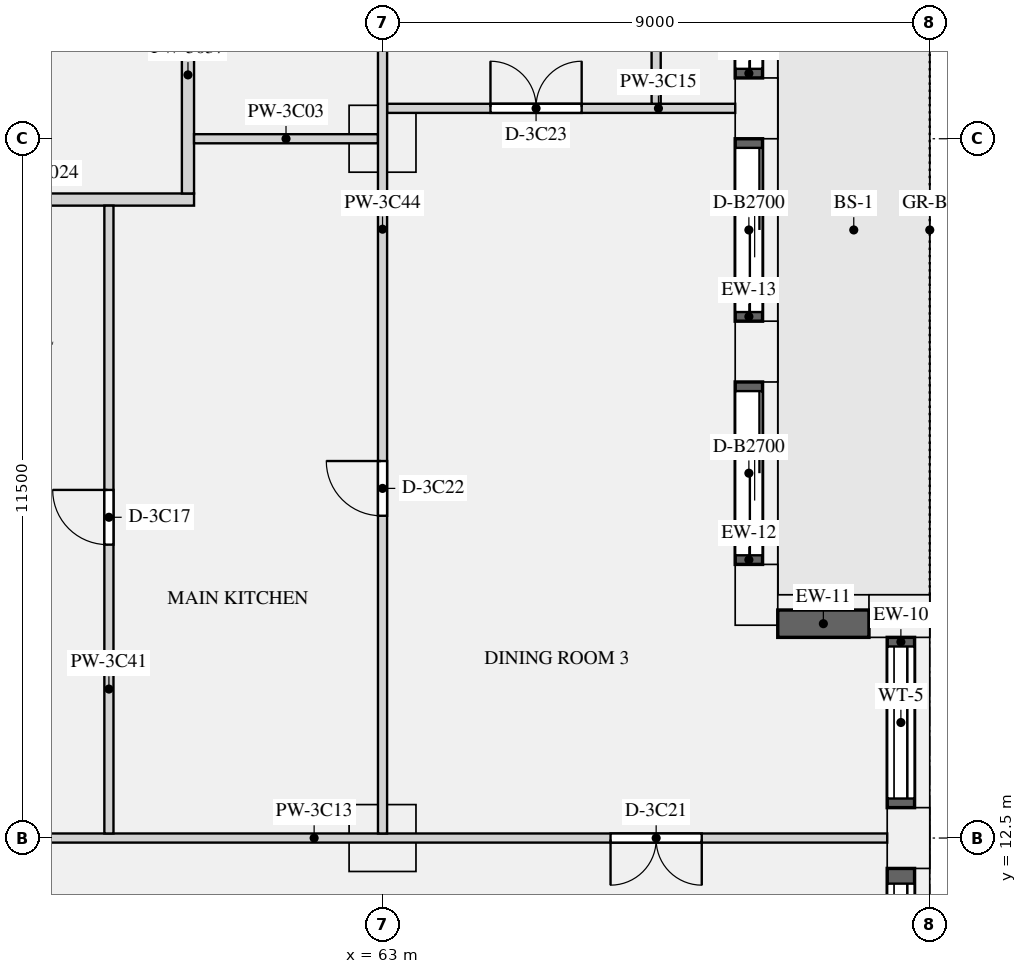
"""IFC4 building model, lengths in metres.
Left out: names, types, materials, properties, quantities, classifications, styles, units other than length and angle.
Written with IfcOpenShell. Run it as: python <this file> out.ifc"""

import sys

from ifc_helpers import new_model, si_unit, direction, frame, frame_2d, origin, origin_2d, place, context, subcontext, project, spatial, rectangle, extrude, element, fill, save


model = new_model("IFC4")
c1 = context("Model", 3, precision=1e-05, world=origin(), true_north=direction((0.0, 1.0)))
c2 = subcontext(c1, "Body", "Model", "MODEL_VIEW")
j1 = project(units=[si_unit("LENGTHUNIT", "METRE"), si_unit("PLANEANGLEUNIT", "RADIAN")], contexts=[c1])
p1 = place(None, origin())
s1 = spatial("IfcSite", under=j1, at=p1, CompositionType="ELEMENT")
p2 = place(p1, origin())
s2 = spatial("IfcBuilding", under=s1, at=p2, CompositionType="ELEMENT")
p3 = place(p2, frame((0.0, 0.0, 160.2)))
s3 = spatial("IfcBuildingStorey", under=s2, at=p3, CompositionType="ELEMENT", Elevation=160.2)
for number, where, z_axis, x_axis in (
    (1, (71.65, 12.5, 0.0), (0.0, 0.0, 1.0), (0.0, 1.0, 0.0)),
    (2, (71.5, 16.15, 0.0), (0.0, 0.0, 1.0), (-1.0, 0.0, 0.0)),
    (3, (69.15, 16.5, 0.0), (0.0, 0.0, 1.0), (0.0, 1.0, 0.0)),
    (4, (69.15, 20.5, 0.0), (0.0, 0.0, 1.0), (0.0, 1.0, 0.0)),
    (5, (69.15, 24.5, 0.0), (0.0, 0.0, 1.0), (0.0, 1.0, 0.0)),
):
    element("IfcColumn", number, at=place(p3, frame(where, z_axis=z_axis, x_axis=x_axis)), inside=s3, PredefinedType="USERDEFINED", context=c2, shape_type="SweptSolid", body=[
        extrude(rectangle(XDim=1.0, YDim=0.7, at=origin_2d()), origin(), (0.0, 0.0, 1.0), 3.15),
    ])
for number, where, z_axis, x_axis in (
    (6, (63.0, 24.0, 0.0), (0.0, 0.0, 1.0), (1.0, 0.0, 0.0)),
    (7, (63.0, 12.5, 0.0), (0.0, 0.0, 1.0), (1.0, 0.0, 0.0)),
):
    element("IfcColumn", number, at=place(p3, frame(where, z_axis=z_axis, x_axis=x_axis)), inside=s3, PredefinedType="COLUMN", context=c2, shape_type="SweptSolid", body=[
        extrude(rectangle(XDim=1.1, YDim=1.1, at=origin_2d()), origin(), (0.0, 0.0, 1.0), 3.15),
    ])
p4 = place(p3, frame((71.525, 9.0, 0.9), z_axis=(0.0, 0.0, 1.0), x_axis=(0.0, 1.0, 0.0)))
e8 = element("IfcWall", 8, at=p4, inside=s3, PredefinedType="SOLIDWALL", context=c2, shape_type="SweptSolid", body=[
    extrude(rectangle(XDim=3.0, YDim=0.45, at=frame_2d((1.5, 0.0))), origin(), (0.0, 0.0, 1.0), 1.93),
])
p5 = place(p4, frame((0.25, 0.0, 0.15)))
e9 = element("IfcOpeningElement", 9, at=p5, cuts=e8, PredefinedType="OPENING", context=c2, shape_type="SweptSolid", body=[
    extrude(rectangle(XDim=2.5, YDim=1.5, at=frame_2d((1.25, 0.75))), frame((0.0, 0.235, 0.0), z_axis=(0.0, -1.0, 0.0), x_axis=(1.0, 0.0, 0.0)), (0.0, 0.0, 1.0), 0.47),
])
p6 = place(p3, frame((71.525, 13.0, 0.9), z_axis=(0.0, 0.0, 1.0), x_axis=(0.0, 1.0, 0.0)))
e10 = element("IfcWall", 10, at=p6, inside=s3, PredefinedType="SOLIDWALL", context=c2, shape_type="SweptSolid", body=[
    extrude(rectangle(XDim=2.8, YDim=0.45, at=frame_2d((1.4, 0.0))), origin(), (0.0, 0.0, 1.0), 1.93),
])
p7 = place(p6, frame((0.15, 0.0, 0.15)))
e11 = element("IfcOpeningElement", 11, at=p7, cuts=e10, PredefinedType="OPENING", context=c2, shape_type="SweptSolid", body=[
    extrude(rectangle(XDim=2.5, YDim=1.5, at=frame_2d((1.25, 0.75))), frame((0.0, 0.235, 0.0), z_axis=(0.0, -1.0, 0.0), x_axis=(1.0, 0.0, 0.0)), (0.0, 0.0, 1.0), 0.47),
])
p8 = place(p3, frame((71.0, 16.025, 0.9), z_axis=(0.0, 0.0, 1.0), x_axis=(-1.0, 0.0, 0.0)))
e12 = element("IfcWall", 12, at=p8, inside=s3, PredefinedType="SOLIDWALL", context=c2, shape_type="SweptSolid", body=[
    extrude(rectangle(XDim=1.5, YDim=0.45, at=frame_2d((0.75, 0.0))), origin(), (0.0, 0.0, 1.0), 1.93),
])
p9 = place(p3, frame((69.025, 17.0, 0.0), z_axis=(0.0, 0.0, 1.0), x_axis=(0.0, 1.0, 0.0)))
e13 = element("IfcWall", 13, at=p9, inside=s3, PredefinedType="SOLIDWALL", context=c2, shape_type="SweptSolid", body=[
    extrude(rectangle(XDim=3.0, YDim=0.45, at=frame_2d((1.5, 0.0))), origin(), (0.0, 0.0, 1.0), 2.83),
])
p10 = place(p9, frame((0.15, 0.0, 0.0)))
e14 = element("IfcOpeningElement", 14, at=p10, cuts=e13, PredefinedType="OPENING", context=c2, shape_type="SweptSolid", body=[
    extrude(rectangle(XDim=2.7, YDim=2.3, at=frame_2d((1.35, 1.15))), frame((0.0, 0.235, 0.0), z_axis=(0.0, -1.0, 0.0), x_axis=(1.0, 0.0, 0.0)), (0.0, 0.0, 1.0), 0.47),
])
p11 = place(p3, frame((69.025, 21.0, 0.0), z_axis=(0.0, 0.0, 1.0), x_axis=(0.0, 1.0, 0.0)))
e15 = element("IfcWall", 15, at=p11, inside=s3, PredefinedType="SOLIDWALL", context=c2, shape_type="SweptSolid", body=[
    extrude(rectangle(XDim=3.0, YDim=0.45, at=frame_2d((1.5, 0.0))), origin(), (0.0, 0.0, 1.0), 2.83),
])
p12 = place(p11, frame((0.15, 0.0, 0.0)))
e16 = element("IfcOpeningElement", 16, at=p12, cuts=e15, PredefinedType="OPENING", context=c2, shape_type="SweptSolid", body=[
    extrude(rectangle(XDim=2.7, YDim=2.3, at=frame_2d((1.35, 1.15))), frame((0.0, 0.235, 0.0), z_axis=(0.0, -1.0, 0.0), x_axis=(1.0, 0.0, 0.0)), (0.0, 0.0, 1.0), 0.47),
])
p13 = place(p3, frame((69.025, 25.0, 0.0), z_axis=(0.0, 0.0, 1.0), x_axis=(0.0, 1.0, 0.0)))
e17 = element("IfcWall", 17, at=p13, inside=s3, PredefinedType="SOLIDWALL", context=c2, shape_type="SweptSolid", body=[
    extrude(rectangle(XDim=3.5, YDim=0.45, at=frame_2d((1.75, 0.0))), origin(), (0.0, 0.0, 1.0), 2.83),
])
p14 = place(p13, frame((0.15, 0.0, 0.0)))
e18 = element("IfcOpeningElement", 18, at=p14, cuts=e17, PredefinedType="OPENING", context=c2, shape_type="SweptSolid", body=[
    extrude(rectangle(XDim=3.2, YDim=2.3, at=frame_2d((1.6, 1.15))), frame((0.0, 0.235, 0.0), z_axis=(0.0, -1.0, 0.0), x_axis=(1.0, 0.0, 0.0)), (0.0, 0.0, 1.0), 0.47),
])
p15 = place(p3, frame((54.9, 23.0, 0.0), z_axis=(0.0, 0.0, 1.0), x_axis=(1.0, 0.0, 0.0)))
e19 = element("IfcWall", 19, at=p15, inside=s3, PredefinedType="PARTITIONING", context=c2, shape_type="SweptSolid", body=[
    extrude(rectangle(XDim=5.0, YDim=0.2, at=frame_2d((2.5, 0.0))), origin(), (0.0, 0.0, 1.0), 2.83),
])
p16 = place(p3, frame((59.8, 23.1, 0.0), z_axis=(0.0, 0.0, 1.0), x_axis=(0.0, 1.0, 0.0)))
e20 = element("IfcWall", 20, at=p16, inside=s3, PredefinedType="PARTITIONING", context=c2, shape_type="SweptSolid", body=[
    extrude(rectangle(XDim=3.9, YDim=0.2, at=frame_2d((1.95, 0.0))), origin(), (0.0, 0.0, 1.0), 2.83),
])
p17 = place(p3, frame((59.9, 24.0, 0.0), z_axis=(0.0, 0.0, 1.0), x_axis=(1.0, 0.0, 0.0)))
e21 = element("IfcWall", 21, at=p17, inside=s3, PredefinedType="PARTITIONING", context=c2, shape_type="SweptSolid", body=[
    extrude(rectangle(XDim=3.025, YDim=0.15, at=frame_2d((1.513, 0.0))), origin(), (0.0, 0.0, 1.0), 2.83),
])
p18 = place(p3, frame((54.0, 12.5, 0.0), z_axis=(0.0, 0.0, 1.0), x_axis=(1.0, 0.0, 0.0)))
e22 = element("IfcWall", 22, at=p18, inside=s3, PredefinedType="PARTITIONING", context=c2, shape_type="SweptSolid", body=[
    extrude(rectangle(XDim=17.3, YDim=0.15, at=frame_2d((8.65, 0.0))), origin(), (0.0, 0.0, 1.0), 2.83),
])
p19 = place(p18, frame((1.5, 0.0, 0.0)))
e23 = element("IfcOpeningElement", 23, at=p19, cuts=e22, PredefinedType="OPENING", context=c2, shape_type="SweptSolid", body=[
    extrude(rectangle(XDim=1.5, YDim=2.1, at=frame_2d((0.75, 1.05))), frame((0.0, 0.085, 0.0), z_axis=(0.0, -1.0, 0.0), x_axis=(1.0, 0.0, 0.0)), (0.0, 0.0, 1.0), 0.17),
])
p20 = place(p18, frame((12.75, 0.0, 0.0)))
e24 = element("IfcOpeningElement", 24, at=p20, cuts=e22, PredefinedType="OPENING", context=c2, shape_type="SweptSolid", body=[
    extrude(rectangle(XDim=1.5, YDim=2.1, at=frame_2d((0.75, 1.05))), frame((0.0, 0.085, 0.0), z_axis=(0.0, -1.0, 0.0), x_axis=(1.0, 0.0, 0.0)), (0.0, 0.0, 1.0), 0.17),
])
p21 = place(p3, frame((63.075, 24.5, 0.0), z_axis=(0.0, 0.0, 1.0), x_axis=(1.0, 0.0, 0.0)))
e25 = element("IfcWall", 25, at=p21, inside=s3, PredefinedType="PARTITIONING", context=c2, shape_type="SweptSolid", body=[
    extrude(rectangle(XDim=5.725, YDim=0.15, at=frame_2d((2.863, 0.0))), origin(), (0.0, 0.0, 1.0), 2.83),
])
p22 = place(p21, frame((1.7, 0.0, 0.0)))
e26 = element("IfcOpeningElement", 26, at=p22, cuts=e25, PredefinedType="OPENING", context=c2, shape_type="SweptSolid", body=[
    extrude(rectangle(XDim=1.5, YDim=2.1, at=frame_2d((0.75, 1.05))), frame((0.0, 0.085, 0.0), z_axis=(0.0, -1.0, 0.0), x_axis=(1.0, 0.0, 0.0)), (0.0, 0.0, 1.0), 0.17),
])
p23 = place(p3, frame((58.5, 12.575, 0.0), z_axis=(0.0, 0.0, 1.0), x_axis=(0.0, 1.0, 0.0)))
e27 = element("IfcWall", 27, at=p23, inside=s3, PredefinedType="PARTITIONING", context=c2, shape_type="SweptSolid", body=[
    extrude(rectangle(XDim=10.325, YDim=0.15, at=frame_2d((5.163, 0.0))), origin(), (0.0, 0.0, 1.0), 2.83),
])
p24 = place(p23, frame((4.75, 0.0, 0.0)))
e28 = element("IfcOpeningElement", 28, at=p24, cuts=e27, PredefinedType="OPENING", context=c2, shape_type="SweptSolid", body=[
    extrude(rectangle(XDim=0.9, YDim=2.1, at=frame_2d((0.45, 1.05))), frame((0.0, 0.085, 0.0), z_axis=(0.0, -1.0, 0.0), x_axis=(1.0, 0.0, 0.0)), (0.0, 0.0, 1.0), 0.17),
])
p25 = place(p3, frame((63.0, 12.575, 0.0), z_axis=(0.0, 0.0, 1.0), x_axis=(0.0, 1.0, 0.0)))
e29 = element("IfcWall", 29, at=p25, inside=s3, PredefinedType="PARTITIONING", context=c2, shape_type="SweptSolid", body=[
    extrude(rectangle(XDim=16.35, YDim=0.15, at=frame_2d((8.175, 0.0))), origin(), (0.0, 0.0, 1.0), 2.83),
])
p26 = place(p25, frame((5.225, 0.0, 0.0)))
e30 = element("IfcOpeningElement", 30, at=p26, cuts=e29, PredefinedType="OPENING", context=c2, shape_type="SweptSolid", body=[
    extrude(rectangle(XDim=0.9, YDim=2.1, at=frame_2d((0.45, 1.05))), frame((0.0, 0.085, 0.0), z_axis=(0.0, -1.0, 0.0), x_axis=(1.0, 0.0, 0.0)), (0.0, 0.0, 1.0), 0.17),
])
p27 = place(p25, frame((13.75, 0.0, 0.0)))
e31 = element("IfcOpeningElement", 31, at=p27, cuts=e29, PredefinedType="OPENING", context=c2, shape_type="SweptSolid", body=[
    extrude(rectangle(XDim=0.9, YDim=2.1, at=frame_2d((0.45, 1.05))), frame((0.0, 0.085, 0.0), z_axis=(0.0, -1.0, 0.0), x_axis=(1.0, 0.0, 0.0)), (0.0, 0.0, 1.0), 0.17),
])
p28 = place(p3, frame((67.5, 24.575, 0.0), z_axis=(0.0, 0.0, 1.0), x_axis=(0.0, 1.0, 0.0)))
e32 = element("IfcWall", 32, at=p28, inside=s3, PredefinedType="PARTITIONING", context=c2, shape_type="SweptSolid", body=[
    extrude(rectangle(XDim=10.75, YDim=0.15, at=frame_2d((5.375, 0.0))), origin(), (0.0, 0.0, 1.0), 2.83),
])
p29 = place(p28, frame((6.875, 0.0, 0.0)))
e33 = element("IfcOpeningElement", 33, at=p29, cuts=e32, PredefinedType="OPENING", context=c2, shape_type="SweptSolid", body=[
    extrude(rectangle(XDim=1.5, YDim=2.1, at=frame_2d((0.75, 1.05))), frame((0.0, 0.085, 0.0), z_axis=(0.0, -1.0, 0.0), x_axis=(1.0, 0.0, 0.0)), (0.0, 0.0, 1.0), 0.17),
])
p30 = place(p5, origin())
e34 = element("IfcWindow", 34, at=p30, inside=s3, PartitioningType="SINGLE_PANEL", PredefinedType="WINDOW", context=c2, shape_type="SweptSolid", body=[
    extrude(rectangle(XDim=2.5, YDim=1.5, at=frame_2d((1.25, 0.75))), frame((0.0, -0.065, 0.0), z_axis=(0.0, -1.0, 0.0), x_axis=(1.0, 0.0, 0.0)), (0.0, 0.0, 1.0), 0.06),
])
fill(e9, e34)
p31 = place(p7, origin())
e35 = element("IfcWindow", 35, at=p31, inside=s3, PartitioningType="SINGLE_PANEL", PredefinedType="WINDOW", context=c2, shape_type="SweptSolid", body=[
    extrude(rectangle(XDim=2.5, YDim=1.5, at=frame_2d((1.25, 0.75))), frame((0.0, -0.065, 0.0), z_axis=(0.0, -1.0, 0.0), x_axis=(1.0, 0.0, 0.0)), (0.0, 0.0, 1.0), 0.06),
])
fill(e11, e35)
p32 = place(p10, origin())
e36 = element("IfcDoor", 36, at=p32, inside=s3, OperationType="SLIDING_TO_LEFT", PredefinedType="DOOR", context=c2, shape_type="SweptSolid", body=[
    extrude(rectangle(XDim=2.7, YDim=2.3, at=frame_2d((1.35, 1.15))), frame((0.0, -0.07, 0.0), z_axis=(0.0, -1.0, 0.0), x_axis=(1.0, 0.0, 0.0)), (0.0, 0.0, 1.0), 0.05),
])
fill(e14, e36)
p33 = place(p12, origin())
e37 = element("IfcDoor", 37, at=p33, inside=s3, OperationType="SLIDING_TO_LEFT", PredefinedType="DOOR", context=c2, shape_type="SweptSolid", body=[
    extrude(rectangle(XDim=2.7, YDim=2.3, at=frame_2d((1.35, 1.15))), frame((0.0, -0.07, 0.0), z_axis=(0.0, -1.0, 0.0), x_axis=(1.0, 0.0, 0.0)), (0.0, 0.0, 1.0), 0.05),
])
fill(e16, e37)
p34 = place(p14, origin())
e38 = element("IfcDoor", 38, at=p34, inside=s3, OperationType="SLIDING_TO_LEFT", PredefinedType="DOOR", context=c2, shape_type="SweptSolid", body=[
    extrude(rectangle(XDim=3.2, YDim=2.3, at=frame_2d((1.6, 1.15))), frame((0.0, -0.07, 0.0), z_axis=(0.0, -1.0, 0.0), x_axis=(1.0, 0.0, 0.0)), (0.0, 0.0, 1.0), 0.05),
])
fill(e18, e38)
p35 = place(p24, origin())
e39 = element("IfcDoor", 39, at=p35, inside=s3, OperationType="SINGLE_SWING_RIGHT", PredefinedType="DOOR", context=c2, shape_type="SweptSolid", body=[
    extrude(rectangle(XDim=0.9, YDim=2.1, at=frame_2d((0.45, 1.05))), frame((0.0, 0.025, 0.0), z_axis=(0.0, -1.0, 0.0), x_axis=(1.0, 0.0, 0.0)), (0.0, 0.0, 1.0), 0.05),
])
fill(e28, e39)
p36 = place(p20, frame((1.5, 0.0, 0.0), z_axis=(0.0, 0.0, 1.0), x_axis=(-1.0, 0.0, 0.0)))
e40 = element("IfcDoor", 40, at=p36, inside=s3, OperationType="DOUBLE_DOOR_SINGLE_SWING", PredefinedType="DOOR", context=c2, shape_type="SweptSolid", body=[
    extrude(rectangle(XDim=1.5, YDim=2.1, at=frame_2d((0.75, 1.05))), frame((0.0, 0.025, 0.0), z_axis=(0.0, -1.0, 0.0), x_axis=(1.0, 0.0, 0.0)), (0.0, 0.0, 1.0), 0.05),
])
fill(e24, e40)
p37 = place(p26, origin())
e41 = element("IfcDoor", 41, at=p37, inside=s3, OperationType="SINGLE_SWING_RIGHT", PredefinedType="DOOR", context=c2, shape_type="SweptSolid", body=[
    extrude(rectangle(XDim=0.9, YDim=2.1, at=frame_2d((0.45, 1.05))), frame((0.0, 0.025, 0.0), z_axis=(0.0, -1.0, 0.0), x_axis=(1.0, 0.0, 0.0)), (0.0, 0.0, 1.0), 0.05),
])
fill(e30, e41)
p38 = place(p22, origin())
e42 = element("IfcDoor", 42, at=p38, inside=s3, OperationType="DOUBLE_DOOR_SINGLE_SWING", PredefinedType="DOOR", context=c2, shape_type="SweptSolid", body=[
    extrude(rectangle(XDim=1.5, YDim=2.1, at=frame_2d((0.75, 1.05))), frame((0.0, 0.025, 0.0), z_axis=(0.0, -1.0, 0.0), x_axis=(1.0, 0.0, 0.0)), (0.0, 0.0, 1.0), 0.05),
])
fill(e26, e42)
save(model, sys.argv[1])
